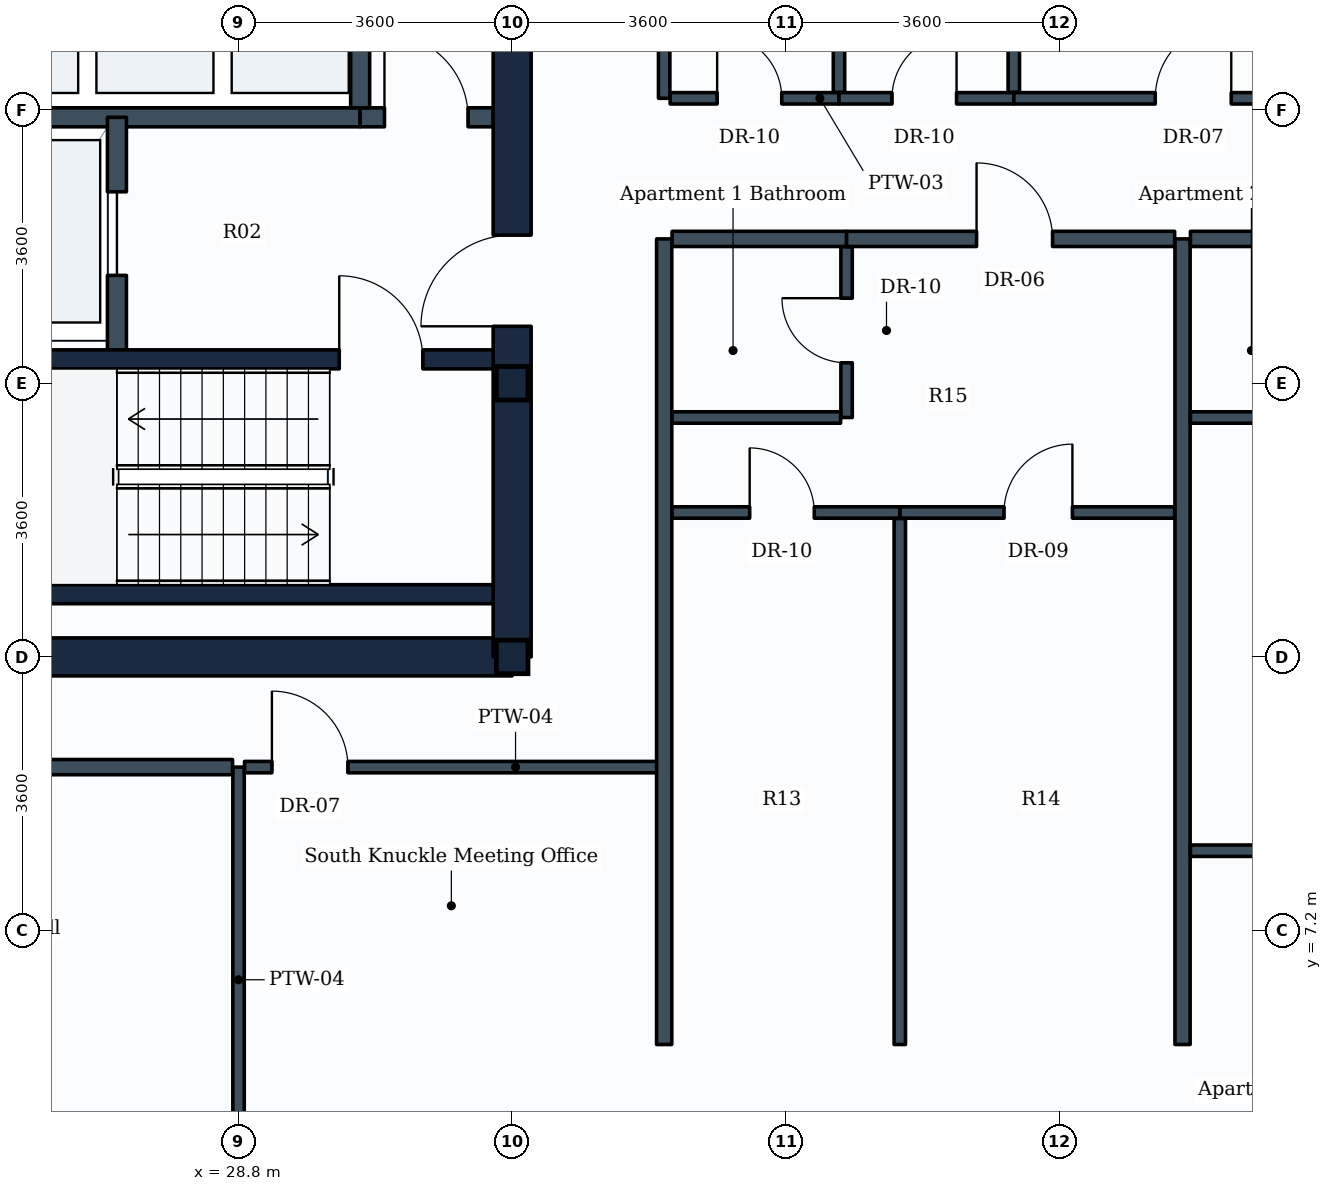
"""IFC4 building model, lengths in metres.
Left out: names, types, materials, properties, quantities, classifications, styles, units other than length and angle.
Written with IfcOpenShell. Run it as: python <this file> out.ifc"""

import sys

from ifc_helpers import new_model, si_unit, direction, frame, frame_2d, origin, origin_2d, place, context, subcontext, project, spatial, rectangle, i_section, extrude, element, fill, save


model = new_model("IFC4")
c1 = context("Model", 3, precision=1e-05, world=origin(), true_north=direction((0.0, 1.0)))
c2 = subcontext(c1, "Body", "Model", "MODEL_VIEW")
j1 = project(units=[si_unit("LENGTHUNIT", "METRE"), si_unit("PLANEANGLEUNIT", "RADIAN")], contexts=[c1])
p1 = place(None, origin())
s1 = spatial("IfcSite", under=j1, at=p1, CompositionType="ELEMENT")
p2 = place(p1, origin())
s2 = spatial("IfcBuilding", under=s1, at=p2, CompositionType="ELEMENT")
p3 = place(p2, frame((0.0, 0.0, 139.0)))
s3 = spatial("IfcBuildingStorey", under=s2, at=p3, CompositionType="ELEMENT", Elevation=139.0)
for number, where, z_axis, x_axis in (
    (1, (32.4, 10.8, 0.0), (0.0, 0.0, 1.0), (1.0, 0.0, 0.0)),
    (2, (32.4, 14.4, 0.0), (0.0, 0.0, 1.0), (1.0, 0.0, 0.0)),
):
    element("IfcColumn", number, at=place(p3, frame(where, z_axis=z_axis, x_axis=x_axis)), inside=s3, PredefinedType="COLUMN", context=c2, shape_type="SweptSolid", body=[
        extrude(i_section(OverallWidth=0.416, OverallDepth=0.442, WebThickness=0.025, FlangeThickness=0.041, FilletRadius=0.015, at=origin_2d()), origin(), (0.0, 0.0, 1.0), 3.8),
    ])
p4 = place(p3, frame((14.4, 10.8, 0.0), z_axis=(0.0, 0.0, 1.0), x_axis=(1.0, 0.0, 0.0)))
e3 = element("IfcWall", 3, at=p4, inside=s3, PredefinedType="SHEAR", context=c2, shape_type="SweptSolid", body=[
    extrude(rectangle(XDim=18.0, YDim=0.5, at=frame_2d((9.0, 0.0))), origin(), (0.0, 0.0, 1.0), 3.55),
])
p5 = place(p3, frame((32.4, 10.8, 0.0), z_axis=(0.0, 0.0, 1.0), x_axis=(0.0, 1.0, 0.0)))
e4 = element("IfcWall", 4, at=p5, inside=s3, PredefinedType="SHEAR", context=c2, shape_type="SweptSolid", body=[
    extrude(rectangle(XDim=14.4, YDim=0.5, at=frame_2d((7.2, 0.0))), origin(), (0.0, 0.0, 1.0), 3.55),
])
p6 = place(p5, frame((4.35, 0.0, 0.0)))
e5 = element("IfcOpeningElement", 5, at=p6, cuts=e4, PredefinedType="OPENING", context=c2, shape_type="SweptSolid", body=[
    extrude(rectangle(XDim=1.2, YDim=2.1, at=frame_2d((0.6, 1.05))), frame((0.0, 0.26, 0.0), z_axis=(0.0, -1.0, 0.0), x_axis=(1.0, 0.0, 0.0)), (0.0, 0.0, 1.0), 0.52),
])
p7 = place(p5, frame((10.0, 0.0, 0.0)))
e6 = element("IfcOpeningElement", 6, at=p7, cuts=e4, PredefinedType="OPENING", context=c2, shape_type="SweptSolid", body=[
    extrude(rectangle(XDim=1.2, YDim=2.1, at=frame_2d((0.6, 1.05))), frame((0.0, 0.26, 0.0), z_axis=(0.0, -1.0, 0.0), x_axis=(1.0, 0.0, 0.0)), (0.0, 0.0, 1.0), 0.52),
])
p8 = place(p3, frame((23.35, 11.625, 0.0), z_axis=(0.0, 0.0, 1.0), x_axis=(1.0, 0.0, 0.0)))
e7 = element("IfcWall", 7, at=p8, inside=s3, PredefinedType="SHEAR", context=c2, shape_type="SweptSolid", body=[
    extrude(rectangle(XDim=8.8, YDim=0.25, at=frame_2d((4.4, 0.0))), origin(), (0.0, 0.0, 1.0), 3.55),
])
p9 = place(p3, frame((23.35, 14.715, 0.0), z_axis=(0.0, 0.0, 1.0), x_axis=(1.0, 0.0, 0.0)))
e8 = element("IfcWall", 8, at=p9, inside=s3, PredefinedType="SHEAR", context=c2, shape_type="SweptSolid", body=[
    extrude(rectangle(XDim=8.8, YDim=0.25, at=frame_2d((4.4, 0.0))), origin(), (0.0, 0.0, 1.0), 3.55),
])
p10 = place(p9, frame((6.775, 0.0, 0.0)))
e9 = element("IfcOpeningElement", 9, at=p10, cuts=e8, PredefinedType="OPENING", context=c2, shape_type="SweptSolid", body=[
    extrude(rectangle(XDim=1.1, YDim=2.1, at=frame_2d((0.55, 1.05))), frame((0.0, 0.135, 0.0), z_axis=(0.0, -1.0, 0.0), x_axis=(1.0, 0.0, 0.0)), (0.0, 0.0, 1.0), 0.27),
])
p11 = place(p3, frame((21.88, 17.9, 0.0), z_axis=(0.0, 0.0, 1.0), x_axis=(1.0, 0.0, 0.0)))
e10 = element("IfcWall", 10, at=p11, inside=s3, PredefinedType="PARTITIONING", context=c2, shape_type="SweptSolid", body=[
    extrude(rectangle(XDim=8.52, YDim=0.25, at=frame_2d((4.26, 0.0))), origin(), (0.0, 0.0, 1.0), 3.535),
])
p12 = place(p3, frame((30.4, 17.9, 0.0), z_axis=(0.0, 0.0, 1.0), x_axis=(1.0, 0.0, 0.0)))
e11 = element("IfcWall", 11, at=p12, inside=s3, PredefinedType="PARTITIONING", context=c2, shape_type="SweptSolid", body=[
    extrude(rectangle(XDim=1.75, YDim=0.25, at=frame_2d((0.875, 0.0))), origin(), (0.0, 0.0, 1.0), 3.535),
])
p13 = place(p12, frame((0.32, 0.0, 0.0)))
e12 = element("IfcOpeningElement", 12, at=p13, cuts=e11, PredefinedType="OPENING", context=c2, shape_type="SweptSolid", body=[
    extrude(rectangle(XDim=1.1, YDim=2.1, at=frame_2d((0.55, 1.05))), frame((0.0, 0.135, 0.0), z_axis=(0.0, -1.0, 0.0), x_axis=(1.0, 0.0, 0.0)), (0.0, 0.0, 1.0), 0.27),
])
p14 = place(p3, frame((27.2, 14.84, 0.0), z_axis=(0.0, 0.0, 1.0), x_axis=(0.0, 1.0, 0.0)))
e13 = element("IfcWall", 13, at=p14, inside=s3, PredefinedType="PARTITIONING", context=c2, shape_type="SweptSolid", body=[
    extrude(rectangle(XDim=3.06, YDim=0.25, at=frame_2d((1.53, 0.0))), origin(), (0.0, 0.0, 1.0), 3.535),
])
p15 = place(p14, frame((0.98, 0.0, 0.0)))
e14 = element("IfcOpeningElement", 14, at=p15, cuts=e13, PredefinedType="OPENING", context=c2, shape_type="SweptSolid", body=[
    extrude(rectangle(XDim=1.1, YDim=2.1, at=frame_2d((0.55, 1.05))), frame((0.0, 0.135, 0.0), z_axis=(0.0, -1.0, 0.0), x_axis=(1.0, 0.0, 0.0)), (0.0, 0.0, 1.0), 0.27),
])
p16 = place(p3, frame((30.4, 18.025, 0.0), z_axis=(0.0, 0.0, 1.0), x_axis=(0.0, 1.0, 0.0)))
e15 = element("IfcWall", 15, at=p16, inside=s3, PredefinedType="PARTITIONING", context=c2, shape_type="SweptSolid", body=[
    extrude(rectangle(XDim=2.27, YDim=0.25, at=frame_2d((1.135, 0.0))), origin(), (0.0, 0.0, 1.0), 3.535),
])
p17 = place(p3, frame((34.4, 18.15, 0.0), z_axis=(0.0, 0.0, 1.0), x_axis=(0.0, 1.0, 0.0)))
e16 = element("IfcWall", 16, at=p17, inside=s3, PredefinedType="PARTITIONING", context=c2, shape_type="SweptSolid", body=[
    extrude(rectangle(XDim=6.896, YDim=0.15, at=frame_2d((3.448, 0.0))), origin(), (0.0, 0.0, 1.0), 2.93),
])
p18 = place(p3, frame((34.479, 18.15, 0.0), z_axis=(0.0, 0.0, 1.0), x_axis=(1.0, 0.0, 0.0)))
e17 = element("IfcWall", 17, at=p18, inside=s3, PredefinedType="PARTITIONING", context=c2, shape_type="SweptSolid", body=[
    extrude(rectangle(XDim=2.221, YDim=0.15, at=frame_2d((1.11, 0.0))), origin(), (0.0, 0.0, 1.0), 3.08),
])
p19 = place(p18, frame((0.618, 0.0, 0.0)))
e18 = element("IfcOpeningElement", 18, at=p19, cuts=e17, PredefinedType="OPENING", context=c2, shape_type="SweptSolid", body=[
    extrude(rectangle(XDim=0.85, YDim=2.1, at=frame_2d((0.425, 1.05))), frame((0.0, 0.085, 0.0), z_axis=(0.0, -1.0, 0.0), x_axis=(1.0, 0.0, 0.0)), (0.0, 0.0, 1.0), 0.17),
])
p20 = place(p3, frame((36.7, 18.229, 0.0), z_axis=(0.0, 0.0, 1.0), x_axis=(0.0, 1.0, 0.0)))
e19 = element("IfcWall", 19, at=p20, inside=s3, PredefinedType="PARTITIONING", context=c2, shape_type="SweptSolid", body=[
    extrude(rectangle(XDim=6.817, YDim=0.15, at=frame_2d((3.408, 0.0))), origin(), (0.0, 0.0, 1.0), 2.93),
])
p21 = place(p3, frame((36.7, 18.15, 0.0), z_axis=(0.0, 0.0, 1.0), x_axis=(1.0, 0.0, 0.0)))
e20 = element("IfcWall", 20, at=p21, inside=s3, PredefinedType="PARTITIONING", context=c2, shape_type="SweptSolid", body=[
    extrude(rectangle(XDim=2.3, YDim=0.15, at=frame_2d((1.15, 0.0))), origin(), (0.0, 0.0, 1.0), 3.08),
])
p22 = place(p21, frame((0.697, 0.0, 0.0)))
e21 = element("IfcOpeningElement", 21, at=p22, cuts=e20, PredefinedType="OPENING", context=c2, shape_type="SweptSolid", body=[
    extrude(rectangle(XDim=0.85, YDim=2.1, at=frame_2d((0.425, 1.05))), frame((0.0, 0.085, 0.0), z_axis=(0.0, -1.0, 0.0), x_axis=(1.0, 0.0, 0.0)), (0.0, 0.0, 1.0), 0.17),
])
p23 = place(p3, frame((39.0, 18.229, 0.0), z_axis=(0.0, 0.0, 1.0), x_axis=(0.0, 1.0, 0.0)))
e22 = element("IfcWall", 22, at=p23, inside=s3, PredefinedType="PARTITIONING", context=c2, shape_type="SweptSolid", body=[
    extrude(rectangle(XDim=3.821, YDim=0.15, at=frame_2d((1.911, 0.0))), origin(), (0.0, 0.0, 1.0), 3.08),
])
p24 = place(p3, frame((28.8, 9.35, 0.0), z_axis=(0.0, 0.0, 1.0), x_axis=(0.0, -1.0, 0.0)))
e23 = element("IfcWall", 23, at=p24, inside=s3, PredefinedType="PARTITIONING", context=c2, shape_type="SweptSolid", body=[
    extrude(rectangle(XDim=5.596, YDim=0.15, at=frame_2d((2.798, 0.0))), origin(), (0.0, 0.0, 1.0), 3.535),
])
p25 = place(p3, frame((12.95, 9.35, 0.0), z_axis=(0.0, 0.0, 1.0), x_axis=(1.0, 0.0, 0.0)))
e24 = element("IfcWall", 24, at=p25, inside=s3, PredefinedType="PARTITIONING", context=c2, shape_type="SweptSolid", body=[
    extrude(rectangle(XDim=15.771, YDim=0.2, at=frame_2d((7.885, 0.0))), origin(), (0.0, 0.0, 1.0), 3.17),
])
p26 = place(p25, frame((4.836, 0.0, 0.0)))
e25 = element("IfcOpeningElement", 25, at=p26, cuts=e24, PredefinedType="OPENING", context=c2, shape_type="SweptSolid", body=[
    extrude(rectangle(XDim=1.0, YDim=2.1, at=frame_2d((0.5, 1.05))), frame((0.0, 0.11, 0.0), z_axis=(0.0, -1.0, 0.0), x_axis=(1.0, 0.0, 0.0)), (0.0, 0.0, 1.0), 0.22),
])
p27 = place(p3, frame((28.879, 9.35, 0.0), z_axis=(0.0, 0.0, 1.0), x_axis=(1.0, 0.0, 0.0)))
e26 = element("IfcWall", 26, at=p27, inside=s3, PredefinedType="PARTITIONING", context=c2, shape_type="SweptSolid", body=[
    extrude(rectangle(XDim=5.521, YDim=0.15, at=frame_2d((2.76, 0.0))), origin(), (0.0, 0.0, 1.0), 3.535),
])
p28 = place(p27, frame((0.36, 0.0, 0.0)))
e27 = element("IfcOpeningElement", 27, at=p28, cuts=e26, PredefinedType="OPENING", context=c2, shape_type="SweptSolid", body=[
    extrude(rectangle(XDim=1.0, YDim=2.1, at=frame_2d((0.5, 1.05))), frame((0.0, 0.085, 0.0), z_axis=(0.0, -1.0, 0.0), x_axis=(1.0, 0.0, 0.0)), (0.0, 0.0, 1.0), 0.17),
])
p29 = place(p3, frame((34.4, 5.7, 0.0), z_axis=(0.0, 0.0, 1.0), x_axis=(0.0, 1.0, 0.0)))
e28 = element("IfcWall", 28, at=p29, inside=s3, PredefinedType="PARTITIONING", context=c2, shape_type="SweptSolid", body=[
    extrude(rectangle(XDim=10.6, YDim=0.2, at=frame_2d((5.3, 0.0))), origin(), (0.0, 0.0, 1.0), 3.17),
])
p30 = place(p3, frame((41.22, 5.7, 0.0), z_axis=(0.0, 0.0, 1.0), x_axis=(0.0, 1.0, 0.0)))
e29 = element("IfcWall", 29, at=p30, inside=s3, PredefinedType="PARTITIONING", context=c2, shape_type="SweptSolid", body=[
    extrude(rectangle(XDim=10.6, YDim=0.2, at=frame_2d((5.3, 0.0))), origin(), (0.0, 0.0, 1.0), 3.13),
])
p31 = place(p3, frame((34.504, 16.3, 0.0), z_axis=(0.0, 0.0, 1.0), x_axis=(1.0, 0.0, 0.0)))
e30 = element("IfcWall", 30, at=p31, inside=s3, PredefinedType="PARTITIONING", context=c2, shape_type="SweptSolid", body=[
    extrude(rectangle(XDim=2.296, YDim=0.2, at=frame_2d((1.148, 0.0))), origin(), (0.0, 0.0, 1.0), 3.22),
])
p32 = place(p3, frame((36.8, 13.95, 0.0), z_axis=(0.0, 0.0, 1.0), x_axis=(0.0, 1.0, 0.0)))
e31 = element("IfcWall", 31, at=p32, inside=s3, PredefinedType="PARTITIONING", context=c2, shape_type="SweptSolid", body=[
    extrude(rectangle(XDim=2.246, YDim=0.15, at=frame_2d((1.123, 0.0))), origin(), (0.0, 0.0, 1.0), 3.17),
])
p33 = place(p32, frame((0.72, 0.0, 0.0)))
e32 = element("IfcOpeningElement", 32, at=p33, cuts=e31, PredefinedType="OPENING", context=c2, shape_type="SweptSolid", body=[
    extrude(rectangle(XDim=0.85, YDim=2.1, at=frame_2d((0.425, 1.05))), frame((0.0, 0.085, 0.0), z_axis=(0.0, -1.0, 0.0), x_axis=(1.0, 0.0, 0.0)), (0.0, 0.0, 1.0), 0.17),
])
p34 = place(p3, frame((34.504, 13.95, 0.0), z_axis=(0.0, 0.0, 1.0), x_axis=(1.0, 0.0, 0.0)))
e33 = element("IfcWall", 33, at=p34, inside=s3, PredefinedType="PARTITIONING", context=c2, shape_type="SweptSolid", body=[
    extrude(rectangle(XDim=2.217, YDim=0.15, at=frame_2d((1.108, 0.0))), origin(), (0.0, 0.0, 1.0), 3.22),
])
p35 = place(p3, frame((36.8, 16.3, 0.0), z_axis=(0.0, 0.0, 1.0), x_axis=(1.0, 0.0, 0.0)))
e34 = element("IfcWall", 34, at=p35, inside=s3, PredefinedType="PARTITIONING", context=c2, shape_type="SweptSolid", body=[
    extrude(rectangle(XDim=4.316, YDim=0.2, at=frame_2d((2.158, 0.0))), origin(), (0.0, 0.0, 1.0), 3.17),
])
p36 = place(p35, frame((1.71, 0.0, 0.0)))
e35 = element("IfcOpeningElement", 35, at=p36, cuts=e34, PredefinedType="OPENING", context=c2, shape_type="SweptSolid", body=[
    extrude(rectangle(XDim=1.0, YDim=2.1, at=frame_2d((0.5, 1.05))), frame((0.0, 0.11, 0.0), z_axis=(0.0, -1.0, 0.0), x_axis=(1.0, 0.0, 0.0)), (0.0, 0.0, 1.0), 0.22),
])
p37 = place(p3, frame((37.5, 12.7, 0.0), z_axis=(0.0, 0.0, 1.0), x_axis=(1.0, 0.0, 0.0)))
e36 = element("IfcWall", 36, at=p37, inside=s3, PredefinedType="PARTITIONING", context=c2, shape_type="SweptSolid", body=[
    extrude(rectangle(XDim=3.616, YDim=0.15, at=frame_2d((1.808, 0.0))), origin(), (0.0, 0.0, 1.0), 3.17),
])
p38 = place(p37, frame((1.371, 0.0, 0.0)))
e37 = element("IfcOpeningElement", 37, at=p38, cuts=e36, PredefinedType="OPENING", context=c2, shape_type="SweptSolid", body=[
    extrude(rectangle(XDim=0.9, YDim=2.1, at=frame_2d((0.45, 1.05))), frame((0.0, 0.085, 0.0), z_axis=(0.0, -1.0, 0.0), x_axis=(1.0, 0.0, 0.0)), (0.0, 0.0, 1.0), 0.17),
])
p39 = place(p3, frame((34.504, 12.7, 0.0), z_axis=(0.0, 0.0, 1.0), x_axis=(1.0, 0.0, 0.0)))
e38 = element("IfcWall", 38, at=p39, inside=s3, PredefinedType="PARTITIONING", context=c2, shape_type="SweptSolid", body=[
    extrude(rectangle(XDim=2.996, YDim=0.15, at=frame_2d((1.498, 0.0))), origin(), (0.0, 0.0, 1.0), 3.22),
])
p40 = place(p39, frame((1.021, 0.0, 0.0)))
e39 = element("IfcOpeningElement", 39, at=p40, cuts=e38, PredefinedType="OPENING", context=c2, shape_type="SweptSolid", body=[
    extrude(rectangle(XDim=0.85, YDim=2.1, at=frame_2d((0.425, 1.05))), frame((0.0, 0.085, 0.0), z_axis=(0.0, -1.0, 0.0), x_axis=(1.0, 0.0, 0.0)), (0.0, 0.0, 1.0), 0.17),
])
p41 = place(p3, frame((37.5, 5.7, 0.0), z_axis=(0.0, 0.0, 1.0), x_axis=(0.0, 1.0, 0.0)))
e40 = element("IfcWall", 40, at=p41, inside=s3, PredefinedType="PARTITIONING", context=c2, shape_type="SweptSolid", body=[
    extrude(rectangle(XDim=6.921, YDim=0.15, at=frame_2d((3.46, 0.0))), origin(), (0.0, 0.0, 1.0), 3.08),
])
p42 = place(p3, frame((41.324, 16.3, 0.0), z_axis=(0.0, 0.0, 1.0), x_axis=(1.0, 0.0, 0.0)))
e41 = element("IfcWall", 41, at=p42, inside=s3, PredefinedType="PARTITIONING", context=c2, shape_type="SweptSolid", body=[
    extrude(rectangle(XDim=2.296, YDim=0.2, at=frame_2d((1.148, 0.0))), origin(), (0.0, 0.0, 1.0), 3.18),
])
p43 = place(p3, frame((41.324, 13.95, 0.0), z_axis=(0.0, 0.0, 1.0), x_axis=(1.0, 0.0, 0.0)))
e42 = element("IfcWall", 42, at=p43, inside=s3, PredefinedType="PARTITIONING", context=c2, shape_type="SweptSolid", body=[
    extrude(rectangle(XDim=2.217, YDim=0.15, at=frame_2d((1.108, 0.0))), origin(), (0.0, 0.0, 1.0), 3.18),
])
p44 = place(p3, frame((41.324, 8.25, 0.0), z_axis=(0.0, 0.0, 1.0), x_axis=(1.0, 0.0, 0.0)))
e43 = element("IfcWall", 43, at=p44, inside=s3, PredefinedType="PARTITIONING", context=c2, shape_type="SweptSolid", body=[
    extrude(rectangle(XDim=2.996, YDim=0.15, at=frame_2d((1.498, 0.0))), origin(), (0.0, 0.0, 1.0), 3.18),
])
p45 = place(p44, frame((1.021, 0.0, 0.0)))
e44 = element("IfcOpeningElement", 44, at=p45, cuts=e43, PredefinedType="OPENING", context=c2, shape_type="SweptSolid", body=[
    extrude(rectangle(XDim=0.85, YDim=2.1, at=frame_2d((0.425, 1.05))), frame((0.0, 0.085, 0.0), z_axis=(0.0, -1.0, 0.0), x_axis=(1.0, 0.0, 0.0)), (0.0, 0.0, 1.0), 0.17),
])
p46 = place(p3, frame((39.0, 18.15, 0.0), z_axis=(0.0, 0.0, 1.0), x_axis=(1.0, 0.0, 0.0)))
e45 = element("IfcWall", 45, at=p46, inside=s3, PredefinedType="PARTITIONING", context=c2, shape_type="SweptSolid", body=[
    extrude(rectangle(XDim=4.696, YDim=0.15, at=frame_2d((2.348, 0.0))), origin(), (0.0, 0.0, 1.0), 3.08),
])
p47 = place(p46, frame((1.861, 0.0, 0.0)))
e46 = element("IfcOpeningElement", 46, at=p47, cuts=e45, PredefinedType="OPENING", context=c2, shape_type="SweptSolid", body=[
    extrude(rectangle(XDim=1.0, YDim=2.1, at=frame_2d((0.5, 1.05))), frame((0.0, 0.085, 0.0), z_axis=(0.0, -1.0, 0.0), x_axis=(1.0, 0.0, 0.0)), (0.0, 0.0, 1.0), 0.17),
])
p48 = place(p10, origin())
e47 = element("IfcDoor", 47, at=p48, inside=s3, OperationType="SINGLE_SWING_LEFT", PredefinedType="DOOR", context=c2, shape_type="SweptSolid", body=[
    extrude(rectangle(XDim=1.1, YDim=2.1, at=frame_2d((0.55, 1.05))), frame((0.0, 0.025, 0.0), z_axis=(0.0, -1.0, 0.0), x_axis=(1.0, 0.0, 0.0)), (0.0, 0.0, 1.0), 0.05),
])
fill(e9, e47)
p49 = place(p15, origin())
e48 = element("IfcDoor", 48, at=p49, inside=s3, OperationType="SLIDING_TO_LEFT", PredefinedType="DOOR", context=c2, shape_type="SweptSolid", body=[
    extrude(rectangle(XDim=1.1, YDim=2.1, at=frame_2d((0.55, 1.05))), frame((0.0, 0.025, 0.0), z_axis=(0.0, -1.0, 0.0), x_axis=(1.0, 0.0, 0.0)), (0.0, 0.0, 1.0), 0.05),
])
fill(e14, e48)
p50 = place(p6, origin())
e49 = element("IfcDoor", 49, at=p50, inside=s3, OperationType="SINGLE_SWING_LEFT", PredefinedType="DOOR", context=c2, shape_type="SweptSolid", body=[
    extrude(rectangle(XDim=1.2, YDim=2.1, at=frame_2d((0.6, 1.05))), frame((0.0, 0.025, 0.0), z_axis=(0.0, -1.0, 0.0), x_axis=(1.0, 0.0, 0.0)), (0.0, 0.0, 1.0), 0.05),
])
fill(e5, e49)
p51 = place(p13, origin())
e50 = element("IfcDoor", 50, at=p51, inside=s3, OperationType="SINGLE_SWING_LEFT", PredefinedType="DOOR", context=c2, shape_type="SweptSolid", body=[
    extrude(rectangle(XDim=1.1, YDim=2.1, at=frame_2d((0.55, 1.05))), frame((0.0, 0.025, 0.0), z_axis=(0.0, -1.0, 0.0), x_axis=(1.0, 0.0, 0.0)), (0.0, 0.0, 1.0), 0.05),
])
fill(e12, e50)
p52 = place(p19, origin())
e51 = element("IfcDoor", 51, at=p52, inside=s3, OperationType="SINGLE_SWING_LEFT", PredefinedType="DOOR", context=c2, shape_type="SweptSolid", body=[
    extrude(rectangle(XDim=0.85, YDim=2.1, at=frame_2d((0.425, 1.05))), frame((0.0, 0.025, 0.0), z_axis=(0.0, -1.0, 0.0), x_axis=(1.0, 0.0, 0.0)), (0.0, 0.0, 1.0), 0.05),
])
fill(e18, e51)
p53 = place(p22, origin())
e52 = element("IfcDoor", 52, at=p53, inside=s3, OperationType="SINGLE_SWING_RIGHT", PredefinedType="DOOR", context=c2, shape_type="SweptSolid", body=[
    extrude(rectangle(XDim=0.85, YDim=2.1, at=frame_2d((0.425, 1.05))), frame((0.0, 0.025, 0.0), z_axis=(0.0, -1.0, 0.0), x_axis=(1.0, 0.0, 0.0)), (0.0, 0.0, 1.0), 0.05),
])
fill(e21, e52)
p54 = place(p28, origin())
e53 = element("IfcDoor", 53, at=p54, inside=s3, OperationType="SINGLE_SWING_LEFT", PredefinedType="DOOR", context=c2, shape_type="SweptSolid", body=[
    extrude(rectangle(XDim=1.0, YDim=2.1, at=frame_2d((0.5, 1.05))), frame((0.0, 0.025, 0.0), z_axis=(0.0, -1.0, 0.0), x_axis=(1.0, 0.0, 0.0)), (0.0, 0.0, 1.0), 0.05),
])
fill(e27, e53)
p55 = place(p33, origin())
e54 = element("IfcDoor", 54, at=p55, inside=s3, OperationType="SINGLE_SWING_RIGHT", PredefinedType="DOOR", context=c2, shape_type="SweptSolid", body=[
    extrude(rectangle(XDim=0.85, YDim=2.1, at=frame_2d((0.425, 1.05))), frame((0.0, 0.025, 0.0), z_axis=(0.0, -1.0, 0.0), x_axis=(1.0, 0.0, 0.0)), (0.0, 0.0, 1.0), 0.05),
])
fill(e32, e54)
p56 = place(p36, origin())
e55 = element("IfcDoor", 55, at=p56, inside=s3, OperationType="SINGLE_SWING_LEFT", PredefinedType="DOOR", context=c2, shape_type="SweptSolid", body=[
    extrude(rectangle(XDim=1.0, YDim=2.1, at=frame_2d((0.5, 1.05))), frame((0.0, 0.025, 0.0), z_axis=(0.0, -1.0, 0.0), x_axis=(1.0, 0.0, 0.0)), (0.0, 0.0, 1.0), 0.05),
])
fill(e35, e55)
p57 = place(p38, origin())
e56 = element("IfcDoor", 56, at=p57, inside=s3, OperationType="SINGLE_SWING_RIGHT", PredefinedType="DOOR", context=c2, shape_type="SweptSolid", body=[
    extrude(rectangle(XDim=0.9, YDim=2.1, at=frame_2d((0.45, 1.05))), frame((0.0, 0.025, 0.0), z_axis=(0.0, -1.0, 0.0), x_axis=(1.0, 0.0, 0.0)), (0.0, 0.0, 1.0), 0.05),
])
fill(e37, e56)
p58 = place(p40, origin())
e57 = element("IfcDoor", 57, at=p58, inside=s3, OperationType="SINGLE_SWING_LEFT", PredefinedType="DOOR", context=c2, shape_type="SweptSolid", body=[
    extrude(rectangle(XDim=0.85, YDim=2.1, at=frame_2d((0.425, 1.05))), frame((0.0, 0.025, 0.0), z_axis=(0.0, -1.0, 0.0), x_axis=(1.0, 0.0, 0.0)), (0.0, 0.0, 1.0), 0.05),
])
fill(e39, e57)
p59 = place(p47, origin())
e58 = element("IfcDoor", 58, at=p59, inside=s3, OperationType="SINGLE_SWING_RIGHT", PredefinedType="DOOR", context=c2, shape_type="SweptSolid", body=[
    extrude(rectangle(XDim=1.0, YDim=2.1, at=frame_2d((0.5, 1.05))), frame((0.0, 0.025, 0.0), z_axis=(0.0, -1.0, 0.0), x_axis=(1.0, 0.0, 0.0)), (0.0, 0.0, 1.0), 0.05),
])
fill(e46, e58)
save(model, sys.argv[1])
